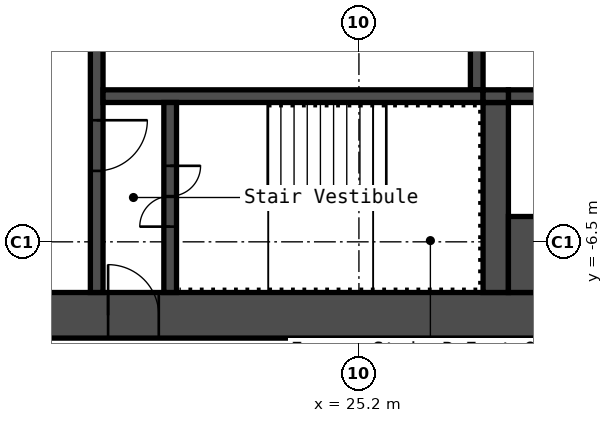
"""IFC4 building model, lengths in metres.
Left out: names, types, materials, properties, quantities, classifications, styles, units other than length and angle.
Written with IfcOpenShell. Run it as: python <this file> out.ifc"""

import sys

from ifc_helpers import new_model, si_unit, direction, frame, frame_2d, origin, place, context, subcontext, project, spatial, rectangle, extrude, element, fill, save


model = new_model("IFC4")
c1 = context("Model", 3, precision=1e-05, world=origin(), true_north=direction((0.0, 1.0)))
c2 = subcontext(c1, "Body", "Model", "MODEL_VIEW")
j1 = project(units=[si_unit("LENGTHUNIT", "METRE"), si_unit("PLANEANGLEUNIT", "RADIAN")], contexts=[c1])
p1 = place(None, origin())
s1 = spatial("IfcSite", under=j1, at=p1, CompositionType="ELEMENT")
p2 = place(p1, origin())
s2 = spatial("IfcBuilding", under=s1, at=p2, CompositionType="ELEMENT")
p3 = place(p2, frame((0.0, 0.0, 42.2)))
s3 = spatial("IfcBuildingStorey", under=s2, at=p3, CompositionType="ELEMENT", Elevation=42.2)
p4 = place(p3, frame((17.7, -7.95, 0.0), z_axis=(0.0, 0.0, 1.0), x_axis=(1.0, 0.0, 0.0)))
e1 = element("IfcWall", 1, at=p4, inside=s3, PredefinedType="SHEAR", context=c2, shape_type="SweptSolid", body=[
    extrude(rectangle(XDim=15.0, YDim=0.9, at=frame_2d((7.5, 0.0))), origin(), (0.0, 0.0, 1.0), 2.8),
])
p5 = place(p4, frame((2.55, 0.0, 0.0)))
e2 = element("IfcOpeningElement", 2, at=p5, cuts=e1, PredefinedType="OPENING", context=c2, shape_type="SweptSolid", body=[
    extrude(rectangle(XDim=1.0, YDim=2.1, at=frame_2d((0.5, 1.05))), frame((0.0, 0.46, 0.0), z_axis=(0.0, -1.0, 0.0), x_axis=(1.0, 0.0, 0.0)), (0.0, 0.0, 1.0), 0.92),
])
p6 = place(p3, frame((20.025, -7.5, 0.0), z_axis=(0.0, 0.0, 1.0), x_axis=(0.0, 1.0, 0.0)))
e3 = element("IfcWall", 3, at=p6, inside=s3, PredefinedType="SHEAR", context=c2, shape_type="SweptSolid", body=[
    extrude(rectangle(XDim=6.3, YDim=0.25, at=frame_2d((3.15, 0.0))), origin(), (0.0, 0.0, 1.0), 2.8),
])
p7 = place(p6, frame((2.4, 0.0, 0.0)))
e4 = element("IfcOpeningElement", 4, at=p7, cuts=e3, PredefinedType="OPENING", context=c2, shape_type="SweptSolid", body=[
    extrude(rectangle(XDim=1.0, YDim=2.1, at=frame_2d((0.5, 1.05))), frame((0.0, 0.135, 0.0), z_axis=(0.0, -1.0, 0.0), x_axis=(1.0, 0.0, 0.0)), (0.0, 0.0, 1.0), 0.27),
])
p8 = place(p3, frame((27.525, -3.5, 0.0), z_axis=(0.0, 0.0, 1.0), x_axis=(0.0, 1.0, 0.0)))
e5 = element("IfcWall", 5, at=p8, inside=s3, PredefinedType="SHEAR", context=c2, shape_type="SweptSolid", body=[
    extrude(rectangle(XDim=2.05, YDim=0.25, at=frame_2d((1.025, 0.0))), origin(), (0.0, 0.0, 1.0), 2.8),
])
p9 = place(p3, frame((20.15, -3.625, 0.0), z_axis=(0.0, 0.0, 1.0), x_axis=(1.0, 0.0, 0.0)))
e6 = element("IfcWall", 6, at=p9, inside=s3, PredefinedType="SHEAR", context=c2, shape_type="SweptSolid", body=[
    extrude(rectangle(XDim=7.5, YDim=0.25, at=frame_2d((3.75, 0.0))), origin(), (0.0, 0.0, 1.0), 2.8),
])
p10 = place(p3, frame((21.475, -7.5, 0.0), z_axis=(0.0, 0.0, 1.0), x_axis=(0.0, 1.0, 0.0)))
e7 = element("IfcWall", 7, at=p10, inside=s3, PredefinedType="SHEAR", context=c2, shape_type="SweptSolid", body=[
    extrude(rectangle(XDim=3.75, YDim=0.25, at=frame_2d((1.875, 0.0))), origin(), (0.0, 0.0, 1.0), 2.8),
])
p11 = place(p10, frame((1.3, 0.0, 0.0)))
e8 = element("IfcOpeningElement", 8, at=p11, cuts=e7, PredefinedType="OPENING", context=c2, shape_type="SweptSolid", body=[
    extrude(rectangle(XDim=1.2, YDim=2.1, at=frame_2d((0.6, 1.05))), frame((0.0, 0.135, 0.0), z_axis=(0.0, -1.0, 0.0), x_axis=(1.0, 0.0, 0.0)), (0.0, 0.0, 1.0), 0.27),
])
p12 = place(p3, frame((27.9, -7.5, 0.0), z_axis=(0.0, 0.0, 1.0), x_axis=(0.0, 1.0, 0.0)))
e9 = element("IfcWall", 9, at=p12, inside=s3, PredefinedType="SHEAR", context=c2, shape_type="SweptSolid", body=[
    extrude(rectangle(XDim=3.75, YDim=0.5, at=frame_2d((1.875, 0.0))), origin(), (0.0, 0.0, 1.0), 2.8),
])
p13 = place(p3, frame((28.15, -3.625, 0.0), z_axis=(0.0, 0.0, 1.0), x_axis=(1.0, 0.0, 0.0)))
e10 = element("IfcWall", 10, at=p13, inside=s3, PredefinedType="SHEAR", context=c2, shape_type="SweptSolid", body=[
    extrude(rectangle(XDim=4.55, YDim=0.25, at=frame_2d((2.275, 0.0))), origin(), (0.0, 0.0, 1.0), 2.8),
])
p14 = place(p3, frame((28.15, -6.75, 0.0), z_axis=(0.0, 0.0, 1.0), x_axis=(1.0, 0.0, 0.0)))
e11 = element("IfcWall", 11, at=p14, inside=s3, PredefinedType="SHEAR", context=c2, shape_type="SweptSolid", body=[
    extrude(rectangle(XDim=4.55, YDim=1.5, at=frame_2d((2.275, 0.0))), origin(), (0.0, 0.0, 1.0), 2.8),
])
p15 = place(p3, frame((27.65, -3.625, 0.0), z_axis=(0.0, 0.0, 1.0), x_axis=(1.0, 0.0, 0.0)))
e12 = element("IfcWall", 12, at=p15, inside=s3, PredefinedType="SHEAR", context=c2, shape_type="SweptSolid", body=[
    extrude(rectangle(XDim=0.5, YDim=0.25, at=frame_2d((0.25, 0.0))), origin(), (0.0, 0.0, 1.0), 2.8),
])
p16 = place(p5, origin())
e13 = element("IfcDoor", 13, at=p16, inside=s3, OperationType="SINGLE_SWING_RIGHT", PredefinedType="DOOR", context=c2, shape_type="SweptSolid", body=[
    extrude(rectangle(XDim=1.0, YDim=2.1, at=frame_2d((0.5, 1.05))), frame((0.0, 0.025, 0.0), z_axis=(0.0, -1.0, 0.0), x_axis=(1.0, 0.0, 0.0)), (0.0, 0.0, 1.0), 0.05),
])
fill(e2, e13)
p17 = place(p11, origin())
e14 = element("IfcDoor", 14, at=p17, inside=s3, OperationType="DOUBLE_DOOR_SINGLE_SWING", PredefinedType="DOOR", context=c2, shape_type="SweptSolid", body=[
    extrude(rectangle(XDim=1.2, YDim=2.1, at=frame_2d((0.6, 1.05))), frame((0.0, 0.025, 0.0), z_axis=(0.0, -1.0, 0.0), x_axis=(1.0, 0.0, 0.0)), (0.0, 0.0, 1.0), 0.05),
])
fill(e8, e14)
p18 = place(p7, origin())
e15 = element("IfcDoor", 15, at=p18, inside=s3, OperationType="SINGLE_SWING_RIGHT", PredefinedType="DOOR", context=c2, shape_type="SweptSolid", body=[
    extrude(rectangle(XDim=1.0, YDim=2.1, at=frame_2d((0.5, 1.05))), frame((0.0, 0.025, 0.0), z_axis=(0.0, -1.0, 0.0), x_axis=(1.0, 0.0, 0.0)), (0.0, 0.0, 1.0), 0.05),
])
fill(e4, e15)
save(model, sys.argv[1])
